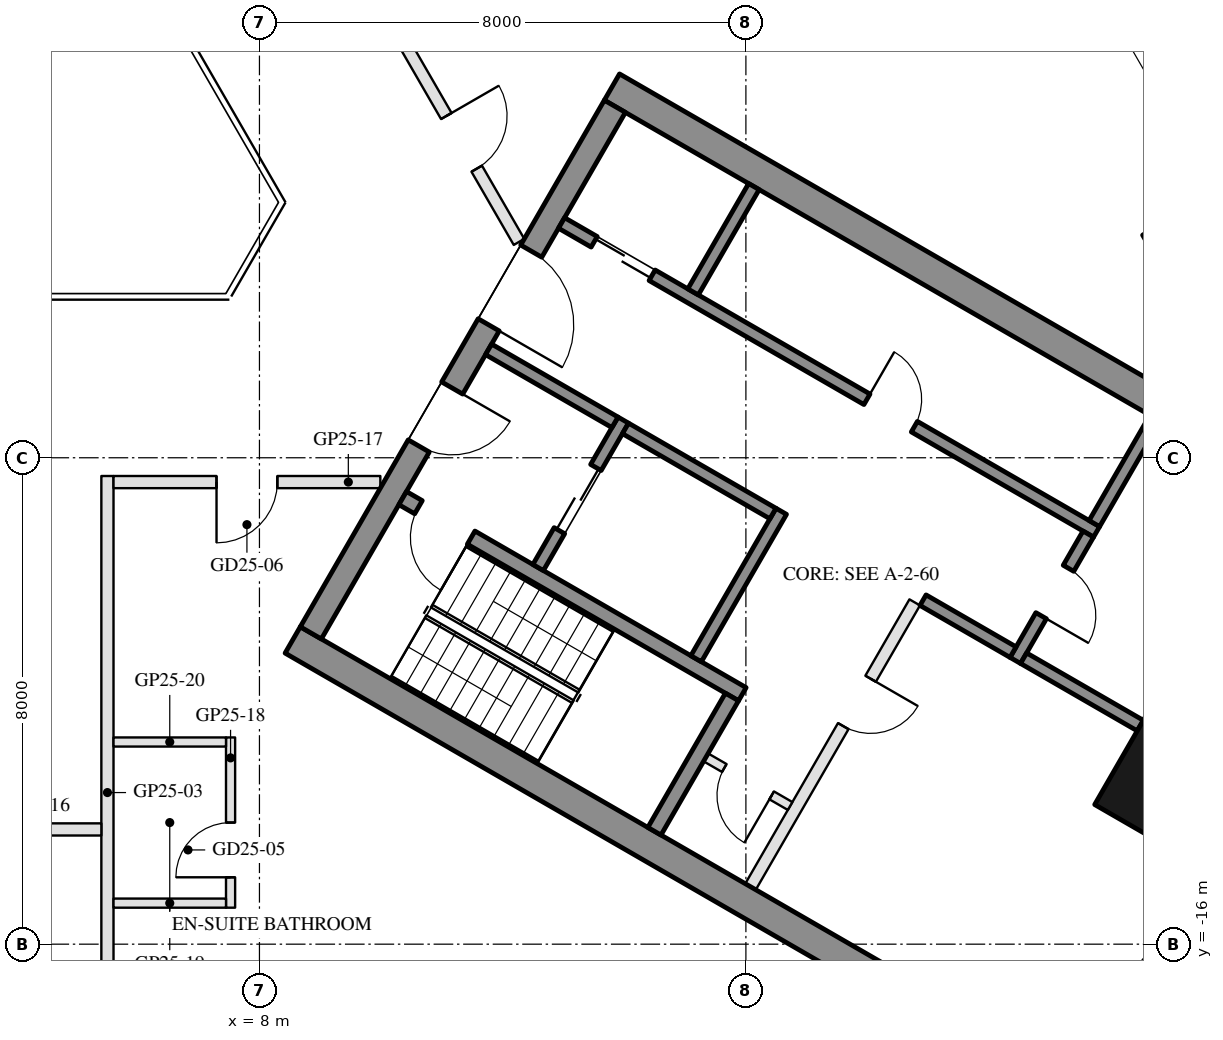
"""IFC4 building model, lengths in metres.
Left out: names, types, materials, properties, quantities, classifications, styles, units other than length and angle.
Written with IfcOpenShell. Run it as: python <this file> out.ifc"""

import sys

from ifc_helpers import new_model, si_unit, direction, frame, frame_2d, origin, origin_2d, place, context, subcontext, project, spatial, rectangle, hollow_rectangle, extrude, boolean, halfspace, element, fill, save


model = new_model("IFC4")
c1 = context("Model", 3, precision=1e-05, world=origin(), true_north=direction((0.0, 1.0)))
c2 = subcontext(c1, "Body", "Model", "MODEL_VIEW")
j1 = project(units=[si_unit("LENGTHUNIT", "METRE"), si_unit("PLANEANGLEUNIT", "RADIAN")], contexts=[c1])
p1 = place(None, origin())
s1 = spatial("IfcSite", under=j1, at=p1, CompositionType="ELEMENT")
p2 = place(p1, origin())
s2 = spatial("IfcBuilding", under=s1, at=p2, CompositionType="ELEMENT")
p3 = place(p2, frame((0.0, 0.0, 261.5)))
s3 = spatial("IfcBuildingStorey", under=s2, at=p3, CompositionType="ELEMENT", Elevation=261.5)
p4 = place(p3, frame((22.968, -4.457, 0.0), z_axis=(0.0, 0.0, 1.0), x_axis=(-0.5, 0.866025403784, 0.0)))
e1 = element("IfcColumn", 1, at=p4, inside=s3, PredefinedType="COLUMN", context=c2, shape_type="SweptSolid", body=[
    boolean("DIFFERENCE", extrude(hollow_rectangle(XDim=0.65, YDim=0.65, WallThickness=0.03, at=origin_2d()), origin(), (0.0, 0.0, 1.0), 3.7), halfspace(frame((0.0, 0.0, 3.653), z_axis=(0.0, 0.0, 1.0), x_axis=(1.0, 0.0, 0.0)), False)),
])
p5 = place(p3, frame((23.102, -13.338, 0.0), z_axis=(0.0, 0.0, 1.0), x_axis=(0.5, 0.866025403784, 0.0)))
e2 = element("IfcColumn", 2, at=p5, inside=s3, PredefinedType="COLUMN", context=c2, shape_type="SweptSolid", body=[
    boolean("DIFFERENCE", extrude(hollow_rectangle(XDim=2.0, YDim=2.0, WallThickness=0.05, at=origin_2d()), origin(), (0.0, 0.0, 1.0), 3.7), halfspace(frame((0.0, 0.0, 3.587), z_axis=(0.0, 0.0, 1.0), x_axis=(1.0, 0.0, 0.0)), False)),
])
p6 = place(p3, frame((21.572, -17.701, 0.0), z_axis=(0.0, 0.0, 1.0), x_axis=(0.642744363867, 0.76608072859, 0.0)))
e3 = element("IfcWall", 3, at=p6, inside=s3, PredefinedType="SOLIDWALL", context=c2, shape_type="SweptSolid", body=[
    extrude(rectangle(XDim=1.855, YDim=0.35, at=frame_2d((0.927, 0.0))), origin(), (0.0, 0.0, 1.0), 3.55),
])
p7 = place(p3, frame((25.494, -6.38, 0.0), z_axis=(0.0, 0.0, 1.0), x_axis=(-0.499999932627, 0.866025442683, 0.0)))
e4 = element("IfcWall", 4, at=p7, inside=s3, PredefinedType="SOLIDWALL", context=c2, shape_type="SweptSolid", body=[
    extrude(rectangle(XDim=11.5, YDim=0.35, at=frame_2d((5.75, 0.0))), origin(), (0.0, 0.0, 1.0), 3.55),
])
p8 = place(p7, frame((0.38, 0.0, 0.3)))
e5 = element("IfcOpeningElement", 5, at=p8, cuts=e4, PredefinedType="OPENING", context=c2, shape_type="SweptSolid", body=[
    extrude(rectangle(XDim=1.8, YDim=2.65, at=frame_2d((0.9, 1.325))), frame((0.0, 0.185, 0.0), z_axis=(0.0, -1.0, 0.0), x_axis=(1.0, 0.0, 0.0)), (0.0, 0.0, 1.0), 0.37),
])
p9 = place(p7, frame((7.525, 0.0, 0.0)))
e6 = element("IfcOpeningElement", 6, at=p9, cuts=e4, PredefinedType="OPENING", context=c2, shape_type="SweptSolid", body=[
    extrude(rectangle(XDim=2.4, YDim=2.4, at=frame_2d((1.2, 1.2))), frame((0.0, 0.185, 0.0), z_axis=(0.0, -1.0, 0.0), x_axis=(1.0, 0.0, 0.0)), (0.0, 0.0, 1.0), 0.37),
])
p10 = place(p7, frame((3.604, 0.0, 0.3)))
e7 = element("IfcOpeningElement", 7, at=p10, cuts=e4, PredefinedType="OPENING", context=c2, shape_type="SweptSolid", body=[
    extrude(rectangle(XDim=1.6, YDim=2.65, at=frame_2d((0.8, 1.325))), frame((0.0, 0.185, 0.0), z_axis=(0.0, -1.0, 0.0), x_axis=(1.0, 0.0, 0.0)), (0.0, 0.0, 1.0), 0.37),
])
p11 = place(p7, frame((5.503, 0.0, 0.3)))
e8 = element("IfcOpeningElement", 8, at=p11, cuts=e4, PredefinedType="OPENING", context=c2, shape_type="SweptSolid", body=[
    extrude(rectangle(XDim=1.6, YDim=2.65, at=frame_2d((0.8, 1.325))), frame((0.0, 0.185, 0.0), z_axis=(0.0, -1.0, 0.0), x_axis=(1.0, 0.0, 0.0)), (0.0, 0.0, 1.0), 0.37),
])
for number, where, z_axis, x_axis in (
    (9, (8.547, -10.997, 0.0), (0.0, 0.0, 1.0), (0.866, -0.5, 0.0)),
    (10, (13.797, -1.903, 0.0), (0.0, 0.0, 1.0), (0.866, -0.5, 0.0)),
):
    element("IfcWall", number, at=place(p3, frame(where, z_axis=z_axis, x_axis=x_axis)), inside=s3, PredefinedType="SHEAR", context=c2, shape_type="SweptSolid", body=[
        extrude(rectangle(XDim=13.934, YDim=0.5, at=frame_2d((6.967, 0.0))), origin(), (0.0, 0.0, 1.0), 3.5),
    ])
p12 = place(p3, frame((8.845, -10.88, 0.0), z_axis=(0.0, 0.0, 1.0), x_axis=(0.500004234368, 0.866022959057, 0.0)))
e11 = element("IfcWall", 11, at=p12, inside=s3, PredefinedType="SHEAR", context=c2, shape_type="SweptSolid", body=[
    extrude(rectangle(XDim=10.0, YDim=0.4, at=frame_2d((5.0, 0.0))), origin(), (0.0, 0.0, 1.0), 3.5),
])
p13 = place(p12, frame((3.55, 0.0, 0.0)))
e12 = element("IfcOpeningElement", 12, at=p13, cuts=e11, PredefinedType="OPENING", context=c2, shape_type="SweptSolid", body=[
    extrude(rectangle(XDim=1.1, YDim=2.1, at=frame_2d((0.55, 1.05))), frame((0.0, 0.21, 0.0), z_axis=(0.0, -1.0, 0.0), x_axis=(1.0, 0.0, 0.0)), (0.0, 0.0, 1.0), 0.42),
])
p14 = place(p12, frame((5.85, 0.0, 0.0)))
e13 = element("IfcOpeningElement", 13, at=p14, cuts=e11, PredefinedType="OPENING", context=c2, shape_type="SweptSolid", body=[
    extrude(rectangle(XDim=1.4, YDim=2.1, at=frame_2d((0.7, 1.05))), frame((0.0, 0.21, 0.0), z_axis=(0.0, -1.0, 0.0), x_axis=(1.0, 0.0, 0.0)), (0.0, 0.0, 1.0), 0.42),
])
p15 = place(p3, frame((10.356, -8.664, 0.0), z_axis=(0.0, 0.0, 1.0), x_axis=(0.866028629588, -0.499994412703, 0.0)))
e14 = element("IfcWall", 14, at=p15, inside=s3, PredefinedType="SHEAR", context=c2, shape_type="SweptSolid", body=[
    extrude(rectangle(XDim=6.45, YDim=0.25, at=frame_2d((3.225, 0.0))), origin(), (0.0, 0.0, 1.0), 3.5),
])
p16 = place(p15, frame((0.3, 0.0, 0.0)))
e15 = element("IfcOpeningElement", 15, at=p16, cuts=e14, PredefinedType="OPENING", context=c2, shape_type="SweptSolid", body=[
    extrude(rectangle(XDim=1.0, YDim=2.1, at=frame_2d((0.5, 1.05))), frame((0.0, 0.135, 0.0), z_axis=(0.0, -1.0, 0.0), x_axis=(1.0, 0.0, 0.0)), (0.0, 0.0, 1.0), 0.27),
])
p17 = place(p3, frame((14.496, -14.143, 0.0), z_axis=(0.0, 0.0, 1.0), x_axis=(0.500062241894, 0.865989465428, 0.0)))
e16 = element("IfcWall", 16, at=p17, inside=s3, PredefinedType="SHEAR", context=c2, shape_type="SweptSolid", body=[
    extrude(rectangle(XDim=2.55, YDim=0.25, at=frame_2d((1.275, 0.0))), origin(), (0.0, 0.0, 1.0), 3.5),
])
p18 = place(p3, frame((15.181, -11.305, 0.0), z_axis=(0.0, 0.0, 1.0), x_axis=(0.49994636267, 0.866056369097, 0.0)))
e17 = element("IfcWall", 17, at=p18, inside=s3, PredefinedType="SHEAR", context=c2, shape_type="SweptSolid", body=[
    extrude(rectangle(XDim=2.8, YDim=0.2, at=frame_2d((1.4, 0.0))), origin(), (0.0, 0.0, 1.0), 3.5),
])
p19 = place(p3, frame((12.583, -9.805, 0.0), z_axis=(0.0, 0.0, 1.0), x_axis=(0.49994636267, 0.866056369097, 0.0)))
e18 = element("IfcWall", 18, at=p19, inside=s3, PredefinedType="SHEAR", context=c2, shape_type="SweptSolid", body=[
    extrude(rectangle(XDim=2.8, YDim=0.2, at=frame_2d((1.4, 0.0))), origin(), (0.0, 0.0, 1.0), 3.5),
])
p20 = place(p19, frame((0.7, 0.0, 0.0)))
e19 = element("IfcOpeningElement", 19, at=p20, cuts=e18, PredefinedType="OPENING", context=c2, shape_type="SweptSolid", body=[
    extrude(rectangle(XDim=1.2, YDim=2.1, at=frame_2d((0.6, 1.05))), frame((0.0, 0.11, 0.0), z_axis=(0.0, -1.0, 0.0), x_axis=(1.0, 0.0, 0.0)), (0.0, 0.0, 1.0), 0.22),
])
p21 = place(p3, frame((11.768, -6.217, 0.0), z_axis=(0.0, 0.0, 1.0), x_axis=(0.866050077142, -0.499957262057, 0.0)))
e20 = element("IfcWall", 20, at=p21, inside=s3, PredefinedType="SHEAR", context=c2, shape_type="SweptSolid", body=[
    extrude(rectangle(XDim=2.4, YDim=0.2, at=frame_2d((1.2, 0.0))), origin(), (0.0, 0.0, 1.0), 3.5),
])
p22 = place(p3, frame((14.02, -7.517, 0.0), z_axis=(0.0, 0.0, 1.0), x_axis=(0.866034573852, -0.49998411664, 0.0)))
e21 = element("IfcWall", 21, at=p22, inside=s3, PredefinedType="SHEAR", context=c2, shape_type="SweptSolid", body=[
    extrude(rectangle(XDim=2.8, YDim=0.2, at=frame_2d((1.4, 0.0))), origin(), (0.0, 0.0, 1.0), 3.5),
])
p23 = place(p3, frame((12.968, -4.138, 0.0), z_axis=(0.0, 0.0, 1.0), x_axis=(0.866028328073, -0.49999493495, 0.0)))
e22 = element("IfcWall", 22, at=p23, inside=s3, PredefinedType="SHEAR", context=c2, shape_type="SweptSolid", body=[
    extrude(rectangle(XDim=10.16, YDim=0.2, at=frame_2d((5.08, 0.0))), origin(), (0.0, 0.0, 1.0), 3.5),
])
p24 = place(p23, frame((0.62, 0.0, 0.0)))
e23 = element("IfcOpeningElement", 23, at=p24, cuts=e22, PredefinedType="OPENING", context=c2, shape_type="SweptSolid", body=[
    extrude(rectangle(XDim=1.1, YDim=2.1, at=frame_2d((0.55, 1.05))), frame((0.0, 0.11, 0.0), z_axis=(0.0, -1.0, 0.0), x_axis=(1.0, 0.0, 0.0)), (0.0, 0.0, 1.0), 0.22),
])
p25 = place(p23, frame((5.8, 0.0, 0.0)))
e24 = element("IfcOpeningElement", 24, at=p25, cuts=e22, PredefinedType="OPENING", context=c2, shape_type="SweptSolid", body=[
    extrude(rectangle(XDim=0.9, YDim=2.1, at=frame_2d((0.45, 1.05))), frame((0.0, 0.11, 0.0), z_axis=(0.0, -1.0, 0.0), x_axis=(1.0, 0.0, 0.0)), (0.0, 0.0, 1.0), 0.22),
])
p26 = place(p3, frame((20.43, -11.333, 0.0), z_axis=(0.0, 0.0, 1.0), x_axis=(0.500001309137, 0.866024647952, 0.0)))
e25 = element("IfcWall", 25, at=p26, inside=s3, PredefinedType="SHEAR", context=c2, shape_type="SweptSolid", body=[
    extrude(rectangle(XDim=2.4, YDim=0.2, at=frame_2d((1.2, 0.0))), origin(), (0.0, 0.0, 1.0), 3.5),
])
p27 = place(p26, frame((0.85, 0.0, 0.0)))
e26 = element("IfcOpeningElement", 26, at=p27, cuts=e25, PredefinedType="OPENING", context=c2, shape_type="SweptSolid", body=[
    extrude(rectangle(XDim=0.9, YDim=2.1, at=frame_2d((0.45, 1.05))), frame((0.0, 0.11, 0.0), z_axis=(0.0, -1.0, 0.0), x_axis=(1.0, 0.0, 0.0)), (0.0, 0.0, 1.0), 0.22),
])
p28 = place(p3, frame((18.913, -10.342, 0.0), z_axis=(0.0, 0.0, 1.0), x_axis=(0.866038183914, -0.499977863513, 0.0)))
e27 = element("IfcWall", 27, at=p28, inside=s3, PredefinedType="SHEAR", context=c2, shape_type="SweptSolid", body=[
    extrude(rectangle(XDim=1.71, YDim=0.2, at=frame_2d((0.855, 0.0))), origin(), (0.0, 0.0, 1.0), 3.5),
])
for number, where, z_axis, x_axis in (
    (28, (15.131, -5.272, 0.0), (0.0, 0.0, 1.0), (0.5, 0.866, 0.0)),
    (29, (21.73, -9.082, 0.0), (0.0, 0.0, 1.0), (0.5, 0.866, 0.0)),
):
    element("IfcWall", number, at=place(p3, frame(where, z_axis=z_axis, x_axis=x_axis)), inside=s3, PredefinedType="SHEAR", context=c2, shape_type="SweptSolid", body=[
        extrude(rectangle(XDim=2.0, YDim=0.2, at=frame_2d((1.0, 0.0))), origin(), (0.0, 0.0, 1.0), 3.5),
    ])
p29 = place(p3, frame((20.567, -11.297, 0.0), z_axis=(0.0, 0.0, 1.0), x_axis=(0.866079196458, -0.49990681678, 0.0)))
e30 = element("IfcWall", 30, at=p29, inside=s3, PredefinedType="SHEAR", context=c2, shape_type="SweptSolid", body=[
    extrude(rectangle(XDim=2.216, YDim=0.2, at=frame_2d((1.108, 0.0))), origin(), (0.0, 0.0, 1.0), 3.5),
])
p30 = place(p3, frame((16.076, -15.055, 0.0), z_axis=(0.0, 0.0, 1.0), x_axis=(0.499995103361, 0.866028230842, 0.0)))
e31 = element("IfcWall", 31, at=p30, inside=s3, PredefinedType="PARTITIONING", context=c2, shape_type="SweptSolid", body=[
    extrude(rectangle(XDim=5.4, YDim=0.2, at=frame_2d((2.7, 0.0))), origin(), (0.0, 0.0, 1.0), 3.5),
])
p31 = place(p30, frame((3.05, 0.0, 0.0)))
e32 = element("IfcOpeningElement", 32, at=p31, cuts=e31, PredefinedType="OPENING", context=c2, shape_type="SweptSolid", body=[
    extrude(rectangle(XDim=0.9, YDim=2.1, at=frame_2d((0.45, 1.05))), frame((0.0, 0.11, 0.0), z_axis=(0.0, -1.0, 0.0), x_axis=(1.0, 0.0, 0.0)), (0.0, 0.0, 1.0), 0.22),
])
p32 = place(p3, frame((15.342, -12.928, 0.0), z_axis=(0.0, 0.0, 1.0), x_axis=(0.865989903783, -0.500061482766, 0.0)))
e33 = element("IfcWall", 33, at=p32, inside=s3, PredefinedType="PARTITIONING", context=c2, shape_type="SweptSolid", body=[
    extrude(rectangle(XDim=1.6, YDim=0.15, at=frame_2d((0.8, 0.0))), origin(), (0.0, 0.0, 1.0), 3.5),
])
p33 = place(p32, frame((0.35, 0.0, 0.0)))
e34 = element("IfcOpeningElement", 34, at=p33, cuts=e33, PredefinedType="OPENING", context=c2, shape_type="SweptSolid", body=[
    extrude(rectangle(XDim=0.9, YDim=2.1, at=frame_2d((0.45, 1.05))), frame((0.0, 0.085, 0.0), z_axis=(0.0, -1.0, 0.0), x_axis=(1.0, 0.0, 0.0)), (0.0, 0.0, 1.0), 0.17),
])
p34 = place(p3, frame((5.5, -18.713, 0.0), z_axis=(0.0, 0.0, 1.0), x_axis=(0.0, 1.0, 0.0)))
e35 = element("IfcWall", 35, at=p34, inside=s3, PredefinedType="PARTITIONING", context=c2, shape_type="SweptSolid", body=[
    extrude(rectangle(XDim=10.413, YDim=0.2, at=frame_2d((5.207, 0.0))), origin(), (0.0, 0.0, 1.0), 3.1),
])
p35 = place(p3, frame((5.4, -14.113, 0.0), z_axis=(0.0, 0.0, 1.0), x_axis=(-1.0, 0.0, 0.0)))
e36 = element("IfcWall", 36, at=p35, inside=s3, PredefinedType="PARTITIONING", context=c2, shape_type="SweptSolid", body=[
    extrude(rectangle(XDim=5.435, YDim=0.2, at=frame_2d((2.718, 0.0))), origin(), (0.0, 0.0, 1.0), 3.0),
])
p36 = place(p35, frame((2.218, 0.0, 0.0)))
e37 = element("IfcOpeningElement", 37, at=p36, cuts=e36, PredefinedType="OPENING", context=c2, shape_type="SweptSolid", body=[
    extrude(rectangle(XDim=1.0, YDim=2.1, at=frame_2d((0.5, 1.05))), frame((0.0, 0.11, 0.0), z_axis=(0.0, -1.0, 0.0), x_axis=(1.0, 0.0, 0.0)), (0.0, 0.0, 1.0), 0.22),
])
p37 = place(p3, frame((9.988, -8.4, 0.0), z_axis=(0.0, 0.0, 1.0), x_axis=(-1.0, 0.0, 0.0)))
e38 = element("IfcWall", 38, at=p37, inside=s3, PredefinedType="PARTITIONING", context=c2, shape_type="SweptSolid", body=[
    extrude(rectangle(XDim=4.388, YDim=0.2, at=frame_2d((2.194, 0.0))), origin(), (0.0, 0.0, 1.0), 3.0),
])
p38 = place(p37, frame((1.694, 0.0, 0.0)))
e39 = element("IfcOpeningElement", 39, at=p38, cuts=e38, PredefinedType="OPENING", context=c2, shape_type="SweptSolid", body=[
    extrude(rectangle(XDim=1.0, YDim=2.1, at=frame_2d((0.5, 1.05))), frame((0.0, 0.11, 0.0), z_axis=(0.0, -1.0, 0.0), x_axis=(1.0, 0.0, 0.0)), (0.0, 0.0, 1.0), 0.22),
])
p39 = place(p3, frame((7.525, -15.4, 0.0), z_axis=(0.0, 0.0, 1.0), x_axis=(0.0, 1.0, 0.0)))
e40 = element("IfcWall", 40, at=p39, inside=s3, PredefinedType="PARTITIONING", context=c2, shape_type="SweptSolid", body=[
    extrude(rectangle(XDim=2.8, YDim=0.15, at=frame_2d((1.4, 0.0))), origin(), (0.0, 0.0, 1.0), 3.0),
])
p40 = place(p39, frame((0.5, 0.0, 0.0)))
e41 = element("IfcOpeningElement", 41, at=p40, cuts=e40, PredefinedType="OPENING", context=c2, shape_type="SweptSolid", body=[
    extrude(rectangle(XDim=0.9, YDim=2.1, at=frame_2d((0.45, 1.05))), frame((0.0, 0.085, 0.0), z_axis=(0.0, -1.0, 0.0), x_axis=(1.0, 0.0, 0.0)), (0.0, 0.0, 1.0), 0.17),
])
for number, where, z_axis, x_axis in (
    (42, (5.6, -15.325, 0.0), (0.0, 0.0, 1.0), (1.0, 0.0, 0.0)),
    (43, (5.6, -12.675, 0.0), (0.0, 0.0, 1.0), (1.0, 0.0, 0.0)),
):
    element("IfcWall", number, at=place(p3, frame(where, z_axis=z_axis, x_axis=x_axis)), inside=s3, PredefinedType="PARTITIONING", context=c2, shape_type="SweptSolid", body=[
        extrude(rectangle(XDim=1.85, YDim=0.15, at=frame_2d((0.925, 0.0))), origin(), (0.0, 0.0, 1.0), 3.55),
    ])
p41 = place(p3, frame((10.378, -1.175, 0.0), z_axis=(0.0, 0.0, 1.0), x_axis=(0.50004096614, -0.86600175068, 0.0)))
e44 = element("IfcWall", 44, at=p41, inside=s3, PredefinedType="PARTITIONING", context=c2, shape_type="SweptSolid", body=[
    extrude(rectangle(XDim=3.782, YDim=0.2, at=frame_2d((1.891, 0.0))), origin(), (0.0, 0.0, 1.0), 3.0),
])
p42 = place(p41, frame((1.391, 0.0, 0.0)))
e45 = element("IfcOpeningElement", 45, at=p42, cuts=e44, PredefinedType="OPENING", context=c2, shape_type="SweptSolid", body=[
    extrude(rectangle(XDim=1.0, YDim=2.1, at=frame_2d((0.5, 1.05))), frame((0.0, 0.11, 0.0), z_axis=(0.0, -1.0, 0.0), x_axis=(1.0, 0.0, 0.0)), (0.0, 0.0, 1.0), 0.22),
])
p43 = place(p11, origin())
e46 = element("IfcWindow", 46, at=p43, inside=s3, PartitioningType="SINGLE_PANEL", PredefinedType="WINDOW", context=c2, shape_type="SweptSolid", body=[
    extrude(rectangle(XDim=1.6, YDim=2.65, at=frame_2d((0.8, 1.325))), frame((0.0, 0.03, 0.0), z_axis=(0.0, -1.0, 0.0), x_axis=(1.0, 0.0, 0.0)), (0.0, 0.0, 1.0), 0.06),
])
fill(e8, e46)
p44 = place(p20, origin())
e47 = element("IfcDoor", 47, at=p44, inside=s3, OperationType="DOUBLE_DOOR_SLIDING", PredefinedType="DOOR", context=c2, shape_type="SweptSolid", body=[
    extrude(rectangle(XDim=1.2, YDim=2.1, at=frame_2d((0.6, 1.05))), frame((0.0, 0.025, 0.0), z_axis=(0.0, -1.0, 0.0), x_axis=(1.0, 0.0, 0.0)), (0.0, 0.0, 1.0), 0.05),
])
fill(e19, e47)
p45 = place(p33, frame((0.9, 0.0, 0.0), z_axis=(0.0, 0.0, 1.0), x_axis=(-1.0, 0.0, 0.0)))
e48 = element("IfcDoor", 48, at=p45, inside=s3, OperationType="SINGLE_SWING_LEFT", PredefinedType="DOOR", context=c2, shape_type="SweptSolid", body=[
    extrude(rectangle(XDim=0.9, YDim=2.1, at=frame_2d((0.45, 1.05))), frame((0.0, 0.025, 0.0), z_axis=(0.0, -1.0, 0.0), x_axis=(1.0, 0.0, 0.0)), (0.0, 0.0, 1.0), 0.05),
])
fill(e34, e48)
p46 = place(p24, origin())
e49 = element("IfcDoor", 49, at=p46, inside=s3, OperationType="DOUBLE_DOOR_SLIDING", PredefinedType="DOOR", context=c2, shape_type="SweptSolid", body=[
    extrude(rectangle(XDim=1.1, YDim=2.1, at=frame_2d((0.55, 1.05))), frame((0.0, 0.025, 0.0), z_axis=(0.0, -1.0, 0.0), x_axis=(1.0, 0.0, 0.0)), (0.0, 0.0, 1.0), 0.05),
])
fill(e23, e49)
p47 = place(p25, origin())
e50 = element("IfcDoor", 50, at=p47, inside=s3, OperationType="SINGLE_SWING_LEFT", PredefinedType="DOOR", context=c2, shape_type="SweptSolid", body=[
    extrude(rectangle(XDim=0.9, YDim=2.1, at=frame_2d((0.45, 1.05))), frame((0.0, 0.025, 0.0), z_axis=(0.0, -1.0, 0.0), x_axis=(1.0, 0.0, 0.0)), (0.0, 0.0, 1.0), 0.05),
])
fill(e24, e50)
p48 = place(p27, frame((0.9, 0.0, 0.0), z_axis=(0.0, 0.0, 1.0), x_axis=(-1.0, 0.0, 0.0)))
e51 = element("IfcDoor", 51, at=p48, inside=s3, OperationType="SINGLE_SWING_RIGHT", PredefinedType="DOOR", context=c2, shape_type="SweptSolid", body=[
    extrude(rectangle(XDim=0.9, YDim=2.1, at=frame_2d((0.45, 1.05))), frame((0.0, 0.025, 0.0), z_axis=(0.0, -1.0, 0.0), x_axis=(1.0, 0.0, 0.0)), (0.0, 0.0, 1.0), 0.05),
])
fill(e26, e51)
p49 = place(p31, frame((0.9, 0.0, 0.0), z_axis=(0.0, 0.0, 1.0), x_axis=(-1.0, 0.0, 0.0)))
e52 = element("IfcDoor", 52, at=p49, inside=s3, OperationType="SINGLE_SWING_LEFT", PredefinedType="DOOR", context=c2, shape_type="SweptSolid", body=[
    extrude(rectangle(XDim=0.9, YDim=2.1, at=frame_2d((0.45, 1.05))), frame((0.0, 0.025, 0.0), z_axis=(0.0, -1.0, 0.0), x_axis=(1.0, 0.0, 0.0)), (0.0, 0.0, 1.0), 0.05),
])
fill(e32, e52)
p50 = place(p13, frame((1.1, 0.0, 0.0), z_axis=(0.0, 0.0, 1.0), x_axis=(-1.0, 0.0, 0.0)))
e53 = element("IfcDoor", 53, at=p50, inside=s3, OperationType="SINGLE_SWING_LEFT", PredefinedType="DOOR", context=c2, shape_type="SweptSolid", body=[
    extrude(rectangle(XDim=1.1, YDim=2.1, at=frame_2d((0.55, 1.05))), frame((0.0, 0.025, 0.0), z_axis=(0.0, -1.0, 0.0), x_axis=(1.0, 0.0, 0.0)), (0.0, 0.0, 1.0), 0.05),
])
fill(e12, e53)
p51 = place(p14, frame((1.4, 0.0, 0.0), z_axis=(0.0, 0.0, 1.0), x_axis=(-1.0, 0.0, 0.0)))
e54 = element("IfcDoor", 54, at=p51, inside=s3, OperationType="DOUBLE_DOOR_SINGLE_SWING", PredefinedType="DOOR", context=c2, shape_type="SweptSolid", body=[
    extrude(rectangle(XDim=1.4, YDim=2.1, at=frame_2d((0.7, 1.05))), frame((0.0, 0.025, 0.0), z_axis=(0.0, -1.0, 0.0), x_axis=(1.0, 0.0, 0.0)), (0.0, 0.0, 1.0), 0.05),
])
fill(e13, e54)
p52 = place(p16, frame((1.0, 0.0, 0.0), z_axis=(0.0, 0.0, 1.0), x_axis=(-1.0, 0.0, 0.0)))
e55 = element("IfcDoor", 55, at=p52, inside=s3, OperationType="SINGLE_SWING_LEFT", PredefinedType="DOOR", context=c2, shape_type="SweptSolid", body=[
    extrude(rectangle(XDim=1.0, YDim=2.1, at=frame_2d((0.5, 1.05))), frame((0.0, 0.025, 0.0), z_axis=(0.0, -1.0, 0.0), x_axis=(1.0, 0.0, 0.0)), (0.0, 0.0, 1.0), 0.05),
])
fill(e15, e55)
p53 = place(p40, origin())
e56 = element("IfcDoor", 56, at=p53, inside=s3, OperationType="SINGLE_SWING_LEFT", PredefinedType="DOOR", context=c2, shape_type="SweptSolid", body=[
    extrude(rectangle(XDim=0.9, YDim=2.1, at=frame_2d((0.45, 1.05))), frame((0.0, 0.025, 0.0), z_axis=(0.0, -1.0, 0.0), x_axis=(1.0, 0.0, 0.0)), (0.0, 0.0, 1.0), 0.05),
])
fill(e41, e56)
p54 = place(p38, origin())
e57 = element("IfcDoor", 57, at=p54, inside=s3, OperationType="SINGLE_SWING_RIGHT", PredefinedType="DOOR", context=c2, shape_type="SweptSolid", body=[
    extrude(rectangle(XDim=1.0, YDim=2.1, at=frame_2d((0.5, 1.05))), frame((0.0, 0.025, 0.0), z_axis=(0.0, -1.0, 0.0), x_axis=(1.0, 0.0, 0.0)), (0.0, 0.0, 1.0), 0.05),
])
fill(e39, e57)
p55 = place(p42, origin())
e58 = element("IfcDoor", 58, at=p55, inside=s3, OperationType="SINGLE_SWING_LEFT", PredefinedType="DOOR", context=c2, shape_type="SweptSolid", body=[
    extrude(rectangle(XDim=1.0, YDim=2.1, at=frame_2d((0.5, 1.05))), frame((0.0, 0.025, 0.0), z_axis=(0.0, -1.0, 0.0), x_axis=(1.0, 0.0, 0.0)), (0.0, 0.0, 1.0), 0.05),
])
fill(e45, e58)
save(model, sys.argv[1])
